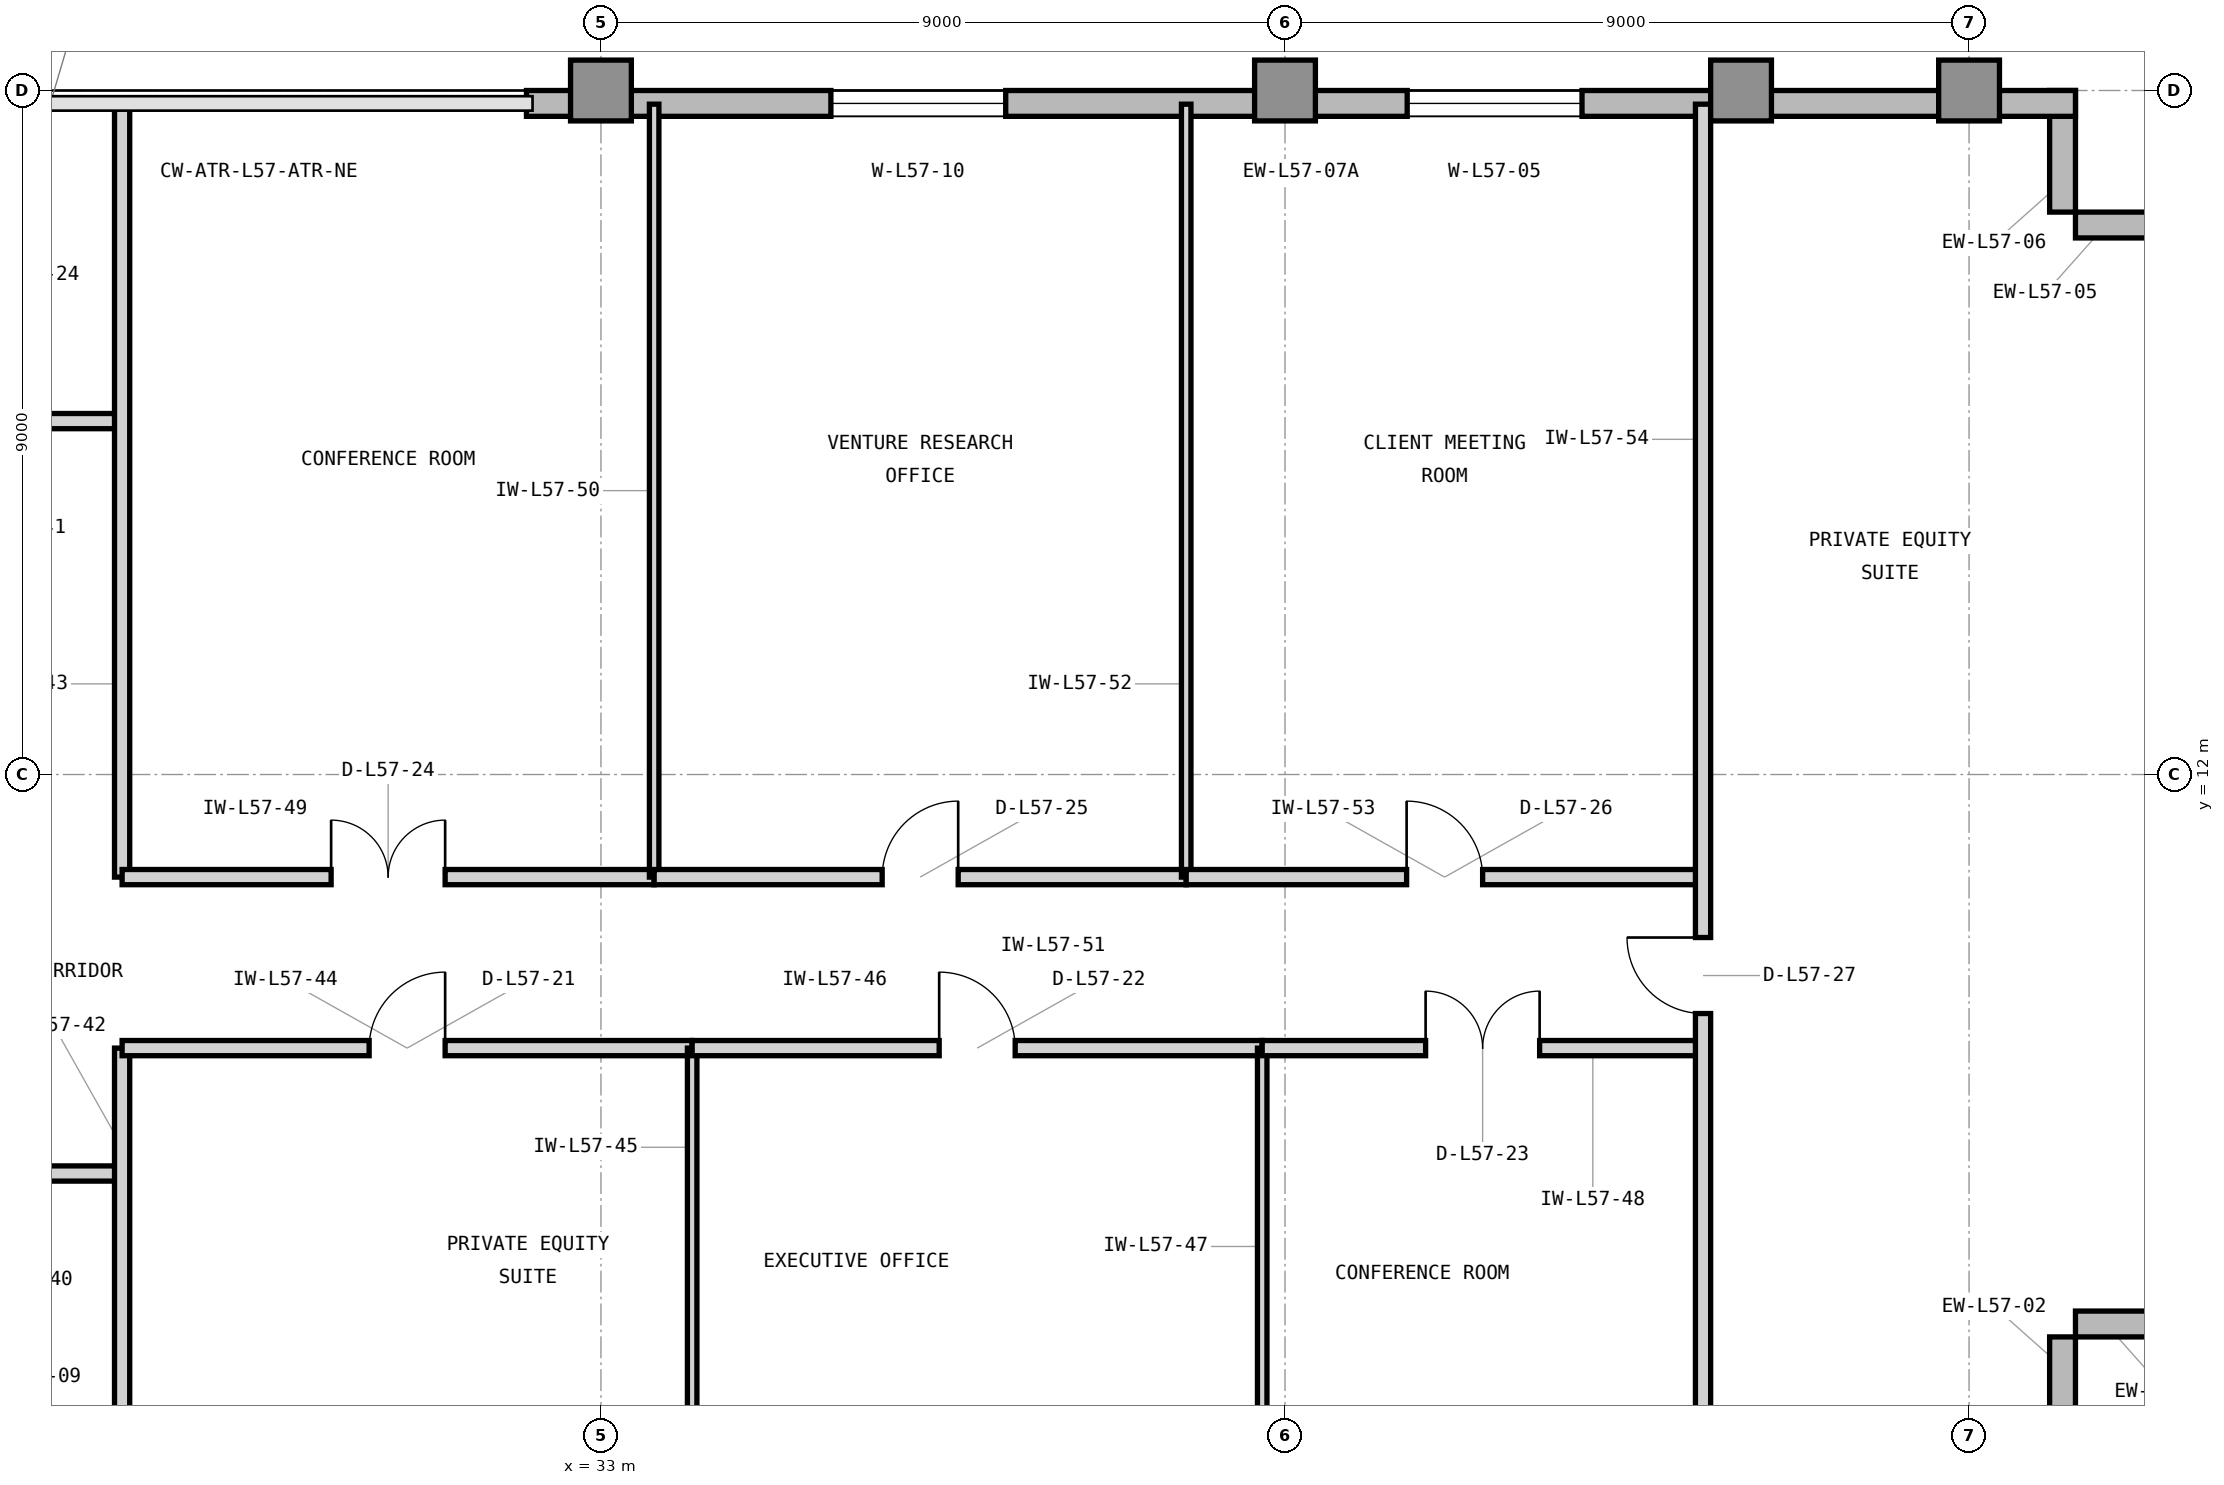
"""IFC4 building model, lengths in metres.
Left out: names, types, materials, properties, quantities, classifications, styles, units other than length and angle.
Written with IfcOpenShell. Run it as: python <this file> out.ifc"""

import sys

from ifc_helpers import new_model, si_unit, direction, frame, frame_2d, origin, origin_2d, place, context, subcontext, project, spatial, rectangle, extrude, element, fill, save


model = new_model("IFC4")
c1 = context("Model", 3, precision=1e-05, world=origin(), true_north=direction((0.0, 1.0)))
c2 = subcontext(c1, "Body", "Model", "MODEL_VIEW")
j1 = project(units=[si_unit("LENGTHUNIT", "METRE"), si_unit("PLANEANGLEUNIT", "RADIAN")], contexts=[c1])
p1 = place(None, origin())
s1 = spatial("IfcSite", under=j1, at=p1, CompositionType="ELEMENT")
p2 = place(p1, origin())
s2 = spatial("IfcBuilding", under=s1, at=p2, CompositionType="ELEMENT")
p3 = place(p2, frame((0.0, 0.0, 235.2)))
s3 = spatial("IfcBuildingStorey", under=s2, at=p3, CompositionType="ELEMENT", Elevation=235.2)
for number, where, z_axis, x_axis in (
    (1, (33.0, 21.0, 0.0), (0.0, 0.0, 1.0), (1.0, 0.0, 0.0)),
    (2, (42.0, 21.0, 0.0), (0.0, 0.0, 1.0), (1.0, 0.0, 0.0)),
    (3, (48.0, 21.0, 0.0), (0.0, 0.0, 1.0), (1.0, 0.0, 0.0)),
    (4, (51.0, 21.0, 0.0), (0.0, 0.0, 1.0), (1.0, 0.0, 0.0)),
):
    element("IfcColumn", number, at=place(p3, frame(where, z_axis=z_axis, x_axis=x_axis)), inside=s3, PredefinedType="COLUMN", context=c2, shape_type="SweptSolid", body=[
        extrude(rectangle(XDim=0.8, YDim=0.8, at=origin_2d()), origin(), (0.0, 0.0, 1.0), 3.9),
    ])
for number, where, z_axis, x_axis in (
    (5, (52.23, 3.0, 0.0), (0.0, 0.0, 1.0), (0.0, 1.0, 0.0)),
    (6, (52.4, 4.77, 0.0), (0.0, 0.0, 1.0), (1.0, 0.0, 0.0)),
    (7, (54.0, 19.23, 0.0), (0.0, 0.0, 1.0), (-1.0, 0.0, 0.0)),
    (8, (52.23, 19.4, 0.0), (0.0, 0.0, 1.0), (0.0, 1.0, 0.0)),
):
    element("IfcWall", number, at=place(p3, frame(where, z_axis=z_axis, x_axis=x_axis)), inside=s3, PredefinedType="STANDARD", context=c2, shape_type="SweptSolid", body=[
        extrude(rectangle(XDim=1.6, YDim=0.34, at=frame_2d((0.8, 0.0))), origin(), (0.0, 0.0, 1.0), 3.7),
    ])
p4 = place(p3, frame((52.4, 20.83, 0.0), z_axis=(0.0, 0.0, 1.0), x_axis=(-1.0, 0.0, 0.0)))
e9 = element("IfcWall", 9, at=p4, inside=s3, PredefinedType="STANDARD", context=c2, shape_type="SweptSolid", body=[
    extrude(rectangle(XDim=20.38, YDim=0.34, at=frame_2d((10.19, 0.0))), origin(), (0.0, 0.0, 1.0), 3.7),
])
p5 = place(p4, frame((6.492, 0.0, 0.9)))
e10 = element("IfcOpeningElement", 10, at=p5, cuts=e9, PredefinedType="OPENING", context=c2, shape_type="SweptSolid", body=[
    extrude(rectangle(XDim=2.3, YDim=2.2, at=frame_2d((1.15, 1.1))), frame((0.0, 0.18, 0.0), z_axis=(0.0, -1.0, 0.0), x_axis=(1.0, 0.0, 0.0)), (0.0, 0.0, 1.0), 0.36),
])
p6 = place(p4, frame((14.075, 0.0, 0.9)))
e11 = element("IfcOpeningElement", 11, at=p6, cuts=e9, PredefinedType="OPENING", context=c2, shape_type="SweptSolid", body=[
    extrude(rectangle(XDim=2.3, YDim=2.2, at=frame_2d((1.15, 1.1))), frame((0.0, 0.18, 0.0), z_axis=(0.0, -1.0, 0.0), x_axis=(1.0, 0.0, 0.0)), (0.0, 0.0, 1.0), 0.36),
])
p7 = place(p3, frame((23.85, 6.75, 0.0), z_axis=(0.0, 0.0, 1.0), x_axis=(1.0, 0.0, 0.0)))
e12 = element("IfcWall", 12, at=p7, inside=s3, PredefinedType="PARTITIONING", context=c2, shape_type="SweptSolid", body=[
    extrude(rectangle(XDim=2.85, YDim=0.2, at=frame_2d((1.425, 0.0))), origin(), (0.0, 0.0, 1.0), 3.69),
])
p8 = place(p7, frame((0.7, 0.0, 0.0)))
e13 = element("IfcOpeningElement", 13, at=p8, cuts=e12, PredefinedType="OPENING", context=c2, shape_type="SweptSolid", body=[
    extrude(rectangle(XDim=1.0, YDim=2.15, at=frame_2d((0.5, 1.075))), frame((0.0, 0.11, 0.0), z_axis=(0.0, -1.0, 0.0), x_axis=(1.0, 0.0, 0.0)), (0.0, 0.0, 1.0), 0.22),
])
p9 = place(p3, frame((23.85, 16.65, 0.0), z_axis=(0.0, 0.0, 1.0), x_axis=(1.0, 0.0, 0.0)))
e14 = element("IfcWall", 14, at=p9, inside=s3, PredefinedType="PARTITIONING", context=c2, shape_type="SweptSolid", body=[
    extrude(rectangle(XDim=2.85, YDim=0.2, at=frame_2d((1.425, 0.0))), origin(), (0.0, 0.0, 1.0), 3.69),
])
p10 = place(p9, frame((0.7, 0.0, 0.0)))
e15 = element("IfcOpeningElement", 15, at=p10, cuts=e14, PredefinedType="OPENING", context=c2, shape_type="SweptSolid", body=[
    extrude(rectangle(XDim=1.0, YDim=2.15, at=frame_2d((0.5, 1.075))), frame((0.0, 0.11, 0.0), z_axis=(0.0, -1.0, 0.0), x_axis=(1.0, 0.0, 0.0)), (0.0, 0.0, 1.0), 0.22),
])
p11 = place(p3, frame((26.7, 3.18, 0.0), z_axis=(0.0, 0.0, 1.0), x_axis=(0.0, 1.0, 0.0)))
e16 = element("IfcWall", 16, at=p11, inside=s3, PredefinedType="PARTITIONING", context=c2, shape_type="SweptSolid", body=[
    extrude(rectangle(XDim=5.22, YDim=0.2, at=frame_2d((2.61, 0.0))), origin(), (0.0, 0.0, 1.0), 3.69),
])
p12 = place(p3, frame((26.7, 10.65, 0.0), z_axis=(0.0, 0.0, 1.0), x_axis=(0.0, 1.0, 0.0)))
e17 = element("IfcWall", 17, at=p12, inside=s3, PredefinedType="PARTITIONING", context=c2, shape_type="SweptSolid", body=[
    extrude(rectangle(XDim=10.17, YDim=0.2, at=frame_2d((5.085, 0.0))), origin(), (0.0, 0.0, 1.0), 3.69),
])
p13 = place(p3, frame((26.7, 8.4, 0.0), z_axis=(0.0, 0.0, 1.0), x_axis=(1.0, 0.0, 0.0)))
e18 = element("IfcWall", 18, at=p13, inside=s3, PredefinedType="PARTITIONING", context=c2, shape_type="SweptSolid", body=[
    extrude(rectangle(XDim=7.5, YDim=0.2, at=frame_2d((3.75, 0.0))), origin(), (0.0, 0.0, 1.0), 3.69),
])
p14 = place(p13, frame((3.25, 0.0, 0.0)))
e19 = element("IfcOpeningElement", 19, at=p14, cuts=e18, PredefinedType="OPENING", context=c2, shape_type="SweptSolid", body=[
    extrude(rectangle(XDim=1.0, YDim=2.15, at=frame_2d((0.5, 1.075))), frame((0.0, 0.11, 0.0), z_axis=(0.0, -1.0, 0.0), x_axis=(1.0, 0.0, 0.0)), (0.0, 0.0, 1.0), 0.22),
])
p15 = place(p3, frame((34.2, 3.18, 0.0), z_axis=(0.0, 0.0, 1.0), x_axis=(0.0, 1.0, 0.0)))
e20 = element("IfcWall", 20, at=p15, inside=s3, PredefinedType="PARTITIONING", context=c2, shape_type="SweptSolid", body=[
    extrude(rectangle(XDim=5.22, YDim=0.125, at=frame_2d((2.61, 0.0))), origin(), (0.0, 0.0, 1.0), 3.69),
])
p16 = place(p3, frame((34.2, 8.4, 0.0), z_axis=(0.0, 0.0, 1.0), x_axis=(1.0, 0.0, 0.0)))
e21 = element("IfcWall", 21, at=p16, inside=s3, PredefinedType="PARTITIONING", context=c2, shape_type="SweptSolid", body=[
    extrude(rectangle(XDim=7.5, YDim=0.2, at=frame_2d((3.75, 0.0))), origin(), (0.0, 0.0, 1.0), 3.69),
])
p17 = place(p16, frame((3.25, 0.0, 0.0)))
e22 = element("IfcOpeningElement", 22, at=p17, cuts=e21, PredefinedType="OPENING", context=c2, shape_type="SweptSolid", body=[
    extrude(rectangle(XDim=1.0, YDim=2.15, at=frame_2d((0.5, 1.075))), frame((0.0, 0.11, 0.0), z_axis=(0.0, -1.0, 0.0), x_axis=(1.0, 0.0, 0.0)), (0.0, 0.0, 1.0), 0.22),
])
p18 = place(p3, frame((41.7, 3.18, 0.0), z_axis=(0.0, 0.0, 1.0), x_axis=(0.0, 1.0, 0.0)))
e23 = element("IfcWall", 23, at=p18, inside=s3, PredefinedType="PARTITIONING", context=c2, shape_type="SweptSolid", body=[
    extrude(rectangle(XDim=5.22, YDim=0.125, at=frame_2d((2.61, 0.0))), origin(), (0.0, 0.0, 1.0), 3.69),
])
p19 = place(p3, frame((41.7, 8.4, 0.0), z_axis=(0.0, 0.0, 1.0), x_axis=(1.0, 0.0, 0.0)))
e24 = element("IfcWall", 24, at=p19, inside=s3, PredefinedType="PARTITIONING", context=c2, shape_type="SweptSolid", body=[
    extrude(rectangle(XDim=5.8, YDim=0.2, at=frame_2d((2.9, 0.0))), origin(), (0.0, 0.0, 1.0), 3.69),
])
p20 = place(p19, frame((2.15, 0.0, 0.0)))
e25 = element("IfcOpeningElement", 25, at=p20, cuts=e24, PredefinedType="OPENING", context=c2, shape_type="SweptSolid", body=[
    extrude(rectangle(XDim=1.5, YDim=2.3, at=frame_2d((0.75, 1.15))), frame((0.0, 0.11, 0.0), z_axis=(0.0, -1.0, 0.0), x_axis=(1.0, 0.0, 0.0)), (0.0, 0.0, 1.0), 0.22),
])
p21 = place(p3, frame((26.7, 10.65, 0.0), z_axis=(0.0, 0.0, 1.0), x_axis=(1.0, 0.0, 0.0)))
e26 = element("IfcWall", 26, at=p21, inside=s3, PredefinedType="PARTITIONING", context=c2, shape_type="SweptSolid", body=[
    extrude(rectangle(XDim=7.0, YDim=0.2, at=frame_2d((3.5, 0.0))), origin(), (0.0, 0.0, 1.0), 3.69),
])
p22 = place(p21, frame((2.75, 0.0, 0.0)))
e27 = element("IfcOpeningElement", 27, at=p22, cuts=e26, PredefinedType="OPENING", context=c2, shape_type="SweptSolid", body=[
    extrude(rectangle(XDim=1.5, YDim=2.3, at=frame_2d((0.75, 1.15))), frame((0.0, 0.11, 0.0), z_axis=(0.0, -1.0, 0.0), x_axis=(1.0, 0.0, 0.0)), (0.0, 0.0, 1.0), 0.22),
])
p23 = place(p3, frame((33.7, 10.65, 0.0), z_axis=(0.0, 0.0, 1.0), x_axis=(0.0, 1.0, 0.0)))
e28 = element("IfcWall", 28, at=p23, inside=s3, PredefinedType="PARTITIONING", context=c2, shape_type="SweptSolid", body=[
    extrude(rectangle(XDim=10.17, YDim=0.125, at=frame_2d((5.085, 0.0))), origin(), (0.0, 0.0, 1.0), 3.69),
])
p24 = place(p3, frame((33.7, 10.65, 0.0), z_axis=(0.0, 0.0, 1.0), x_axis=(1.0, 0.0, 0.0)))
e29 = element("IfcWall", 29, at=p24, inside=s3, PredefinedType="PARTITIONING", context=c2, shape_type="SweptSolid", body=[
    extrude(rectangle(XDim=7.0, YDim=0.2, at=frame_2d((3.5, 0.0))), origin(), (0.0, 0.0, 1.0), 3.69),
])
p25 = place(p24, frame((3.0, 0.0, 0.0)))
e30 = element("IfcOpeningElement", 30, at=p25, cuts=e29, PredefinedType="OPENING", context=c2, shape_type="SweptSolid", body=[
    extrude(rectangle(XDim=1.0, YDim=2.15, at=frame_2d((0.5, 1.075))), frame((0.0, 0.11, 0.0), z_axis=(0.0, -1.0, 0.0), x_axis=(1.0, 0.0, 0.0)), (0.0, 0.0, 1.0), 0.22),
])
p26 = place(p3, frame((40.7, 10.65, 0.0), z_axis=(0.0, 0.0, 1.0), x_axis=(0.0, 1.0, 0.0)))
e31 = element("IfcWall", 31, at=p26, inside=s3, PredefinedType="PARTITIONING", context=c2, shape_type="SweptSolid", body=[
    extrude(rectangle(XDim=10.17, YDim=0.125, at=frame_2d((5.085, 0.0))), origin(), (0.0, 0.0, 1.0), 3.69),
])
p27 = place(p3, frame((40.7, 10.65, 0.0), z_axis=(0.0, 0.0, 1.0), x_axis=(1.0, 0.0, 0.0)))
e32 = element("IfcWall", 32, at=p27, inside=s3, PredefinedType="PARTITIONING", context=c2, shape_type="SweptSolid", body=[
    extrude(rectangle(XDim=6.8, YDim=0.2, at=frame_2d((3.4, 0.0))), origin(), (0.0, 0.0, 1.0), 3.69),
])
p28 = place(p27, frame((2.9, 0.0, 0.0)))
e33 = element("IfcOpeningElement", 33, at=p28, cuts=e32, PredefinedType="OPENING", context=c2, shape_type="SweptSolid", body=[
    extrude(rectangle(XDim=1.0, YDim=2.15, at=frame_2d((0.5, 1.075))), frame((0.0, 0.11, 0.0), z_axis=(0.0, -1.0, 0.0), x_axis=(1.0, 0.0, 0.0)), (0.0, 0.0, 1.0), 0.22),
])
p29 = place(p3, frame((47.5, 3.18, 0.0), z_axis=(0.0, 0.0, 1.0), x_axis=(0.0, 1.0, 0.0)))
e34 = element("IfcWall", 34, at=p29, inside=s3, PredefinedType="PARTITIONING", context=c2, shape_type="SweptSolid", body=[
    extrude(rectangle(XDim=17.64, YDim=0.2, at=frame_2d((8.82, 0.0))), origin(), (0.0, 0.0, 1.0), 3.69),
])
p30 = place(p29, frame((5.675, 0.0, 0.0)))
e35 = element("IfcOpeningElement", 35, at=p30, cuts=e34, PredefinedType="OPENING", context=c2, shape_type="SweptSolid", body=[
    extrude(rectangle(XDim=1.0, YDim=2.15, at=frame_2d((0.5, 1.075))), frame((0.0, 0.11, 0.0), z_axis=(0.0, -1.0, 0.0), x_axis=(1.0, 0.0, 0.0)), (0.0, 0.0, 1.0), 0.22),
])
p31 = place(p5, origin())
e36 = element("IfcWindow", 36, at=p31, inside=s3, PartitioningType="SINGLE_PANEL", PredefinedType="WINDOW", context=c2, shape_type="SweptSolid", body=[
    extrude(rectangle(XDim=2.3, YDim=2.2, at=frame_2d((1.15, 1.1))), frame((0.0, 0.11, 0.0), z_axis=(0.0, -1.0, 0.0), x_axis=(1.0, 0.0, 0.0)), (0.0, 0.0, 1.0), 0.06),
])
fill(e10, e36)
p32 = place(p14, origin())
e37 = element("IfcDoor", 37, at=p32, inside=s3, OperationType="SINGLE_SWING_RIGHT", PredefinedType="DOOR", context=c2, shape_type="SweptSolid", body=[
    extrude(rectangle(XDim=1.0, YDim=2.15, at=frame_2d((0.5, 1.075))), frame((0.0, 0.025, 0.0), z_axis=(0.0, -1.0, 0.0), x_axis=(1.0, 0.0, 0.0)), (0.0, 0.0, 1.0), 0.05),
])
fill(e19, e37)
p33 = place(p17, origin())
e38 = element("IfcDoor", 38, at=p33, inside=s3, OperationType="SINGLE_SWING_LEFT", PredefinedType="DOOR", context=c2, shape_type="SweptSolid", body=[
    extrude(rectangle(XDim=1.0, YDim=2.15, at=frame_2d((0.5, 1.075))), frame((0.0, 0.025, 0.0), z_axis=(0.0, -1.0, 0.0), x_axis=(1.0, 0.0, 0.0)), (0.0, 0.0, 1.0), 0.05),
])
fill(e22, e38)
p34 = place(p20, origin())
e39 = element("IfcDoor", 39, at=p34, inside=s3, OperationType="DOUBLE_DOOR_SINGLE_SWING", PredefinedType="DOOR", context=c2, shape_type="SweptSolid", body=[
    extrude(rectangle(XDim=1.5, YDim=2.3, at=frame_2d((0.75, 1.15))), frame((0.0, 0.025, 0.0), z_axis=(0.0, -1.0, 0.0), x_axis=(1.0, 0.0, 0.0)), (0.0, 0.0, 1.0), 0.05),
])
fill(e25, e39)
p35 = place(p22, origin())
e40 = element("IfcDoor", 40, at=p35, inside=s3, OperationType="DOUBLE_DOOR_SINGLE_SWING", PredefinedType="DOOR", context=c2, shape_type="SweptSolid", body=[
    extrude(rectangle(XDim=1.5, YDim=2.3, at=frame_2d((0.75, 1.15))), frame((0.0, 0.025, 0.0), z_axis=(0.0, -1.0, 0.0), x_axis=(1.0, 0.0, 0.0)), (0.0, 0.0, 1.0), 0.05),
])
fill(e27, e40)
p36 = place(p25, origin())
e41 = element("IfcDoor", 41, at=p36, inside=s3, OperationType="SINGLE_SWING_RIGHT", PredefinedType="DOOR", context=c2, shape_type="SweptSolid", body=[
    extrude(rectangle(XDim=1.0, YDim=2.15, at=frame_2d((0.5, 1.075))), frame((0.0, 0.025, 0.0), z_axis=(0.0, -1.0, 0.0), x_axis=(1.0, 0.0, 0.0)), (0.0, 0.0, 1.0), 0.05),
])
fill(e30, e41)
p37 = place(p28, origin())
e42 = element("IfcDoor", 42, at=p37, inside=s3, OperationType="SINGLE_SWING_LEFT", PredefinedType="DOOR", context=c2, shape_type="SweptSolid", body=[
    extrude(rectangle(XDim=1.0, YDim=2.15, at=frame_2d((0.5, 1.075))), frame((0.0, 0.025, 0.0), z_axis=(0.0, -1.0, 0.0), x_axis=(1.0, 0.0, 0.0)), (0.0, 0.0, 1.0), 0.05),
])
fill(e33, e42)
p38 = place(p30, origin())
e43 = element("IfcDoor", 43, at=p38, inside=s3, OperationType="SINGLE_SWING_RIGHT", PredefinedType="DOOR", context=c2, shape_type="SweptSolid", body=[
    extrude(rectangle(XDim=1.0, YDim=2.15, at=frame_2d((0.5, 1.075))), frame((0.0, 0.025, 0.0), z_axis=(0.0, -1.0, 0.0), x_axis=(1.0, 0.0, 0.0)), (0.0, 0.0, 1.0), 0.05),
])
fill(e35, e43)
p39 = place(p6, origin())
e44 = element("IfcWindow", 44, at=p39, inside=s3, PartitioningType="SINGLE_PANEL", PredefinedType="WINDOW", context=c2, shape_type="SweptSolid", body=[
    extrude(rectangle(XDim=2.3, YDim=2.2, at=frame_2d((1.15, 1.1))), frame((0.0, 0.11, 0.0), z_axis=(0.0, -1.0, 0.0), x_axis=(1.0, 0.0, 0.0)), (0.0, 0.0, 1.0), 0.06),
])
fill(e11, e44)
save(model, sys.argv[1])
